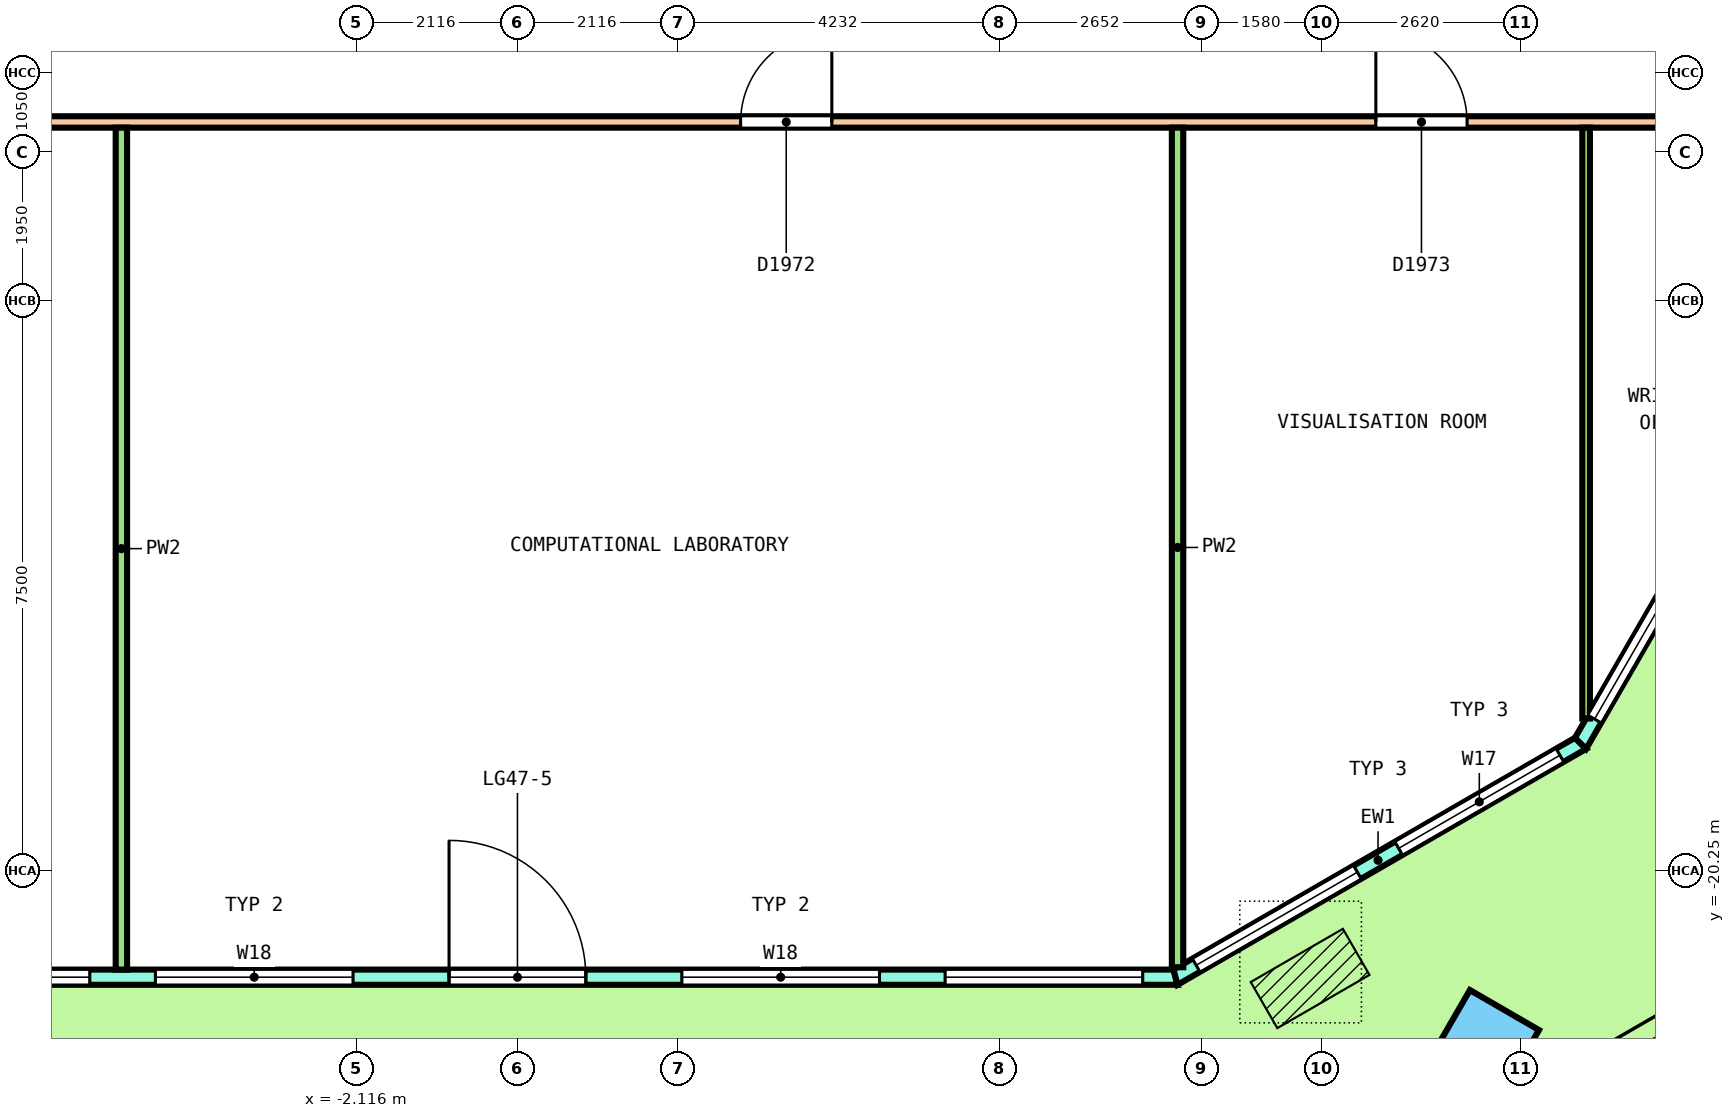
"""IFC4 building model, lengths in metres.
Left out: names, types, materials, properties, quantities, classifications, styles, units other than length and angle.
Written with IfcOpenShell. Run it as: python <this file> out.ifc"""

import sys

from ifc_helpers import new_model, si_unit, direction, frame, frame_2d, origin, origin_2d, place, context, subcontext, project, spatial, polyline, rectangle, outline, extrude, element, fill, save


model = new_model("IFC4")
c1 = context("Model", 3, precision=1e-05, world=origin(), true_north=direction((0.0, 1.0)))
c2 = subcontext(c1, "Body", "Model", "MODEL_VIEW")
j1 = project(units=[si_unit("LENGTHUNIT", "METRE"), si_unit("PLANEANGLEUNIT", "RADIAN")], contexts=[c1])
p1 = place(None, origin())
s1 = spatial("IfcSite", under=j1, at=p1, CompositionType="ELEMENT")
p2 = place(p1, origin())
s2 = spatial("IfcBuilding", under=s1, at=p2, CompositionType="ELEMENT")
p3 = place(p2, frame((0.0, 0.0, 219.4)))
s3 = spatial("IfcBuildingStorey", under=s2, at=p3, CompositionType="ELEMENT", Elevation=219.4)
p4 = place(p3, frame((12.722, -22.538, 0.0), z_axis=(-0.018113955825, -0.03141534774, 0.999342263957), x_axis=(0.865990228712, 0.499075001782, 0.031385767027)))
e1 = element("IfcColumn", 1, at=p4, inside=s3, PredefinedType="COLUMN", context=c2, shape_type="SweptSolid", body=[
    extrude(rectangle(XDim=1.05, YDim=1.05, at=origin_2d()), origin(), (0.0, 0.0, 1.0), 3.653),
])
p5 = place(p3, frame((-8.658, -21.651, 0.0), z_axis=(0.0, 0.0, 1.0), x_axis=(1.0, 0.0, 0.0)))
e2 = element("IfcWall", 2, at=p5, inside=s3, PredefinedType="SOLIDWALL", context=c2, shape_type="SweptSolid", body=[
    extrude(outline(polyline([(-0.027, -0.1), (0.995, -0.1), (2.017, -0.1), (3.038, -0.1), (4.06, -0.1), (5.082, -0.1), (6.104, -0.1), (7.125, -0.1), (8.147, -0.1), (9.168, -0.1), (10.19, -0.1), (11.212, -0.1), (12.234, -0.1), (13.255, -0.1), (14.277, -0.1), (15.299, -0.1), (16.321, -0.1), (17.342, -0.1), (17.289, 0.1), (16.273, 0.1), (15.258, 0.1), (14.242, 0.1), (13.227, 0.1), (12.212, 0.1), (11.196, 0.1), (10.181, 0.1), (9.166, 0.1), (8.15, 0.1), (7.135, 0.1), (6.119, 0.1), (5.104, 0.1), (4.088, 0.1), (3.073, 0.1), (2.058, 0.1), (1.042, 0.1), (0.027, 0.1), (-0.027, -0.1)])), origin(), (0.0, 0.0, 1.0), 3.7),
])
p6 = place(p5, frame((0.432, 0.0, 0.1)))
e3 = element("IfcOpeningElement", 3, at=p6, cuts=e2, PredefinedType="OPENING", context=c2, shape_type="SweptSolid", body=[
    extrude(rectangle(XDim=2.6, YDim=2.65, at=frame_2d((1.3, 1.325))), frame((0.0, 0.11, 0.0), z_axis=(0.0, -1.0, 0.0), x_axis=(1.0, 0.0, 0.0)), (0.0, 0.0, 1.0), 0.22),
])
p7 = place(p5, frame((3.895, 0.0, 0.1)))
e4 = element("IfcOpeningElement", 4, at=p7, cuts=e2, PredefinedType="OPENING", context=c2, shape_type="SweptSolid", body=[
    extrude(rectangle(XDim=2.6, YDim=2.65, at=frame_2d((1.3, 1.325))), frame((0.0, 0.11, 0.0), z_axis=(0.0, -1.0, 0.0), x_axis=(1.0, 0.0, 0.0)), (0.0, 0.0, 1.0), 0.22),
])
p8 = place(p5, frame((7.758, 0.0, 0.0)))
e5 = element("IfcOpeningElement", 5, at=p8, cuts=e2, PredefinedType="OPENING", context=c2, shape_type="SweptSolid", body=[
    extrude(rectangle(XDim=1.8, YDim=2.4, at=frame_2d((0.9, 1.2))), frame((0.0, 0.11, 0.0), z_axis=(0.0, -1.0, 0.0), x_axis=(1.0, 0.0, 0.0)), (0.0, 0.0, 1.0), 0.22),
])
p9 = place(p5, frame((7.758, 0.0, 2.55)))
e6 = element("IfcOpeningElement", 6, at=p9, cuts=e2, PredefinedType="OPENING", context=c2, shape_type="SweptSolid", body=[
    extrude(rectangle(XDim=1.8, YDim=0.2, at=frame_2d((0.9, 0.1))), frame((0.0, 0.11, 0.0), z_axis=(0.0, -1.0, 0.0), x_axis=(1.0, 0.0, 0.0)), (0.0, 0.0, 1.0), 0.22),
])
p10 = place(p5, frame((10.821, 0.0, 0.1)))
e7 = element("IfcOpeningElement", 7, at=p10, cuts=e2, PredefinedType="OPENING", context=c2, shape_type="SweptSolid", body=[
    extrude(rectangle(XDim=2.6, YDim=2.65, at=frame_2d((1.3, 1.325))), frame((0.0, 0.11, 0.0), z_axis=(0.0, -1.0, 0.0), x_axis=(1.0, 0.0, 0.0)), (0.0, 0.0, 1.0), 0.22),
])
p11 = place(p5, frame((14.284, 0.0, 0.1)))
e8 = element("IfcOpeningElement", 8, at=p11, cuts=e2, PredefinedType="OPENING", context=c2, shape_type="SweptSolid", body=[
    extrude(rectangle(XDim=2.6, YDim=2.65, at=frame_2d((1.3, 1.325))), frame((0.0, 0.11, 0.0), z_axis=(0.0, -1.0, 0.0), x_axis=(1.0, 0.0, 0.0)), (0.0, 0.0, 1.0), 0.22),
])
p12 = place(p3, frame((8.658, -21.651, 0.0), z_axis=(0.0, 0.0, 1.0), x_axis=(0.866029647142, 0.499992650217, 0.0)))
e9 = element("IfcWall", 9, at=p12, inside=s3, PredefinedType="SOLIDWALL", context=c2, shape_type="SweptSolid", body=[
    extrude(outline(polyline([(-0.027, -0.1), (1.008, -0.1), (2.042, -0.1), (3.076, -0.1), (4.111, -0.1), (5.145, -0.1), (6.18, -0.1), (6.126, 0.1), (5.109, 0.1), (4.093, 0.1), (3.076, 0.1), (2.06, 0.1), (1.043, 0.1), (0.027, 0.1), (-0.027, -0.1)])), origin(), (0.0, 0.0, 1.0), 3.7),
])
p13 = place(p12, frame((0.313, 0.0, 0.1)))
e10 = element("IfcOpeningElement", 10, at=p13, cuts=e9, PredefinedType="OPENING", context=c2, shape_type="SweptSolid", body=[
    extrude(rectangle(XDim=2.45, YDim=2.65, at=frame_2d((1.225, 1.325))), frame((0.0, 0.11, 0.0), z_axis=(0.0, -1.0, 0.0), x_axis=(1.0, 0.0, 0.0)), (0.0, 0.0, 1.0), 0.22),
])
p14 = place(p12, frame((3.39, 0.0, 0.1)))
e11 = element("IfcOpeningElement", 11, at=p14, cuts=e9, PredefinedType="OPENING", context=c2, shape_type="SweptSolid", body=[
    extrude(rectangle(XDim=2.45, YDim=2.65, at=frame_2d((1.225, 1.325))), frame((0.0, 0.11, 0.0), z_axis=(0.0, -1.0, 0.0), x_axis=(1.0, 0.0, 0.0)), (0.0, 0.0, 1.0), 0.22),
])
p15 = place(p3, frame((13.986, -18.575, 0.0), z_axis=(0.0, 0.0, 1.0), x_axis=(0.500005605865, 0.866022167212, 0.0)))
e12 = element("IfcWall", 12, at=p15, inside=s3, PredefinedType="SOLIDWALL", context=c2, shape_type="SweptSolid", body=[
    extrude(outline(polyline([(-0.027, -0.1), (0.987, -0.1), (2.0, -0.1), (3.013, -0.1), (4.026, -0.1), (5.04, -0.1), (6.053, -0.1), (7.066, -0.1), (8.08, -0.1), (9.093, -0.1), (10.106, -0.1), (11.12, -0.1), (12.133, -0.1), (13.146, -0.1), (14.16, -0.1), (15.173, -0.1), (16.187, -0.1), (17.2, -0.1), (18.213, -0.1), (18.159, 0.1), (17.152, 0.1), (16.145, 0.1), (15.137, 0.1), (14.13, 0.1), (13.123, 0.1), (12.115, 0.1), (11.108, 0.1), (10.101, 0.1), (9.093, 0.1), (8.086, 0.1), (7.078, 0.1), (6.071, 0.1), (5.064, 0.1), (4.056, 0.1), (3.049, 0.1), (2.042, 0.1), (1.034, 0.1), (0.027, 0.1), (-0.027, -0.1)])), origin(), (0.0, 0.0, 1.0), 3.7),
])
p16 = place(p15, frame((0.369, 0.0, 0.1)))
e13 = element("IfcOpeningElement", 13, at=p16, cuts=e12, PredefinedType="OPENING", context=c2, shape_type="SweptSolid", body=[
    extrude(rectangle(XDim=2.9, YDim=2.65, at=frame_2d((1.45, 1.325))), frame((0.0, 0.11, 0.0), z_axis=(0.0, -1.0, 0.0), x_axis=(1.0, 0.0, 0.0)), (0.0, 0.0, 1.0), 0.22),
])
p17 = place(p15, frame((4.006, 0.0, 0.1)))
e14 = element("IfcOpeningElement", 14, at=p17, cuts=e12, PredefinedType="OPENING", context=c2, shape_type="SweptSolid", body=[
    extrude(rectangle(XDim=2.9, YDim=2.65, at=frame_2d((1.45, 1.325))), frame((0.0, 0.11, 0.0), z_axis=(0.0, -1.0, 0.0), x_axis=(1.0, 0.0, 0.0)), (0.0, 0.0, 1.0), 0.22),
])
p18 = place(p15, frame((8.193, 0.0, 0.0)))
e15 = element("IfcOpeningElement", 15, at=p18, cuts=e12, PredefinedType="OPENING", context=c2, shape_type="SweptSolid", body=[
    extrude(rectangle(XDim=1.8, YDim=2.4, at=frame_2d((0.9, 1.2))), frame((0.0, 0.11, 0.0), z_axis=(0.0, -1.0, 0.0), x_axis=(1.0, 0.0, 0.0)), (0.0, 0.0, 1.0), 0.22),
])
p19 = place(p15, frame((8.193, 0.0, 2.55)))
e16 = element("IfcOpeningElement", 16, at=p19, cuts=e12, PredefinedType="OPENING", context=c2, shape_type="SweptSolid", body=[
    extrude(rectangle(XDim=1.8, YDim=0.2, at=frame_2d((0.9, 0.1))), frame((0.0, 0.11, 0.0), z_axis=(0.0, -1.0, 0.0), x_axis=(1.0, 0.0, 0.0)), (0.0, 0.0, 1.0), 0.22),
])
p20 = place(p15, frame((11.281, 0.0, 0.1)))
e17 = element("IfcOpeningElement", 17, at=p20, cuts=e12, PredefinedType="OPENING", context=c2, shape_type="SweptSolid", body=[
    extrude(rectangle(XDim=2.9, YDim=2.65, at=frame_2d((1.45, 1.325))), frame((0.0, 0.11, 0.0), z_axis=(0.0, -1.0, 0.0), x_axis=(1.0, 0.0, 0.0)), (0.0, 0.0, 1.0), 0.22),
])
p21 = place(p15, frame((14.918, 0.0, 0.1)))
e18 = element("IfcOpeningElement", 18, at=p21, cuts=e12, PredefinedType="OPENING", context=c2, shape_type="SweptSolid", body=[
    extrude(rectangle(XDim=2.9, YDim=2.65, at=frame_2d((1.45, 1.325))), frame((0.0, 0.11, 0.0), z_axis=(0.0, -1.0, 0.0), x_axis=(1.0, 0.0, 0.0)), (0.0, 0.0, 1.0), 0.22),
])
p22 = place(p3, frame((-15.45, -10.4, 0.0), z_axis=(0.0, 0.0, 1.0), x_axis=(1.0, 0.0, 0.0)))
e19 = element("IfcWall", 19, at=p22, inside=s3, PredefinedType="PARTITIONING", context=c2, shape_type="SweptSolid", body=[
    extrude(rectangle(XDim=31.025, YDim=0.15, at=frame_2d((15.512, 0.0))), origin(), (0.0, 0.0, 1.0), 2.8),
])
p23 = place(p22, frame((4.173, 0.0, 0.0)))
e20 = element("IfcOpeningElement", 20, at=p23, cuts=e19, PredefinedType="OPENING", context=c2, shape_type="SweptSolid", body=[
    extrude(rectangle(XDim=1.2, YDim=2.1, at=frame_2d((0.6, 1.05))), frame((0.0, 0.085, 0.0), z_axis=(0.0, -1.0, 0.0), x_axis=(1.0, 0.0, 0.0)), (0.0, 0.0, 1.0), 0.17),
])
p24 = place(p22, frame((18.386, 0.0, 0.0)))
e21 = element("IfcOpeningElement", 21, at=p24, cuts=e19, PredefinedType="OPENING", context=c2, shape_type="SweptSolid", body=[
    extrude(rectangle(XDim=1.2, YDim=2.1, at=frame_2d((0.6, 1.05))), frame((0.0, 0.085, 0.0), z_axis=(0.0, -1.0, 0.0), x_axis=(1.0, 0.0, 0.0)), (0.0, 0.0, 1.0), 0.17),
])
p25 = place(p22, frame((26.743, 0.0, 0.0)))
e22 = element("IfcOpeningElement", 22, at=p25, cuts=e19, PredefinedType="OPENING", context=c2, shape_type="SweptSolid", body=[
    extrude(rectangle(XDim=1.2, YDim=2.1, at=frame_2d((0.6, 1.05))), frame((0.0, 0.085, 0.0), z_axis=(0.0, -1.0, 0.0), x_axis=(1.0, 0.0, 0.0)), (0.0, 0.0, 1.0), 0.17),
])
p26 = place(p3, frame((-5.211, -21.552, 0.0), z_axis=(0.0, 0.0, 1.0), x_axis=(0.0, 1.0, 0.0)))
e23 = element("IfcWall", 23, at=p26, inside=s3, PredefinedType="PARTITIONING", context=c2, shape_type="SweptSolid", body=[
    extrude(rectangle(XDim=11.076, YDim=0.15, at=frame_2d((5.538, 0.0))), origin(), (0.0, 0.0, 1.0), 2.8),
])
p27 = place(p3, frame((8.685, -21.521, 0.0), z_axis=(0.0, 0.0, 1.0), x_axis=(0.0, 1.0, 0.0)))
e24 = element("IfcWall", 24, at=p27, inside=s3, PredefinedType="PARTITIONING", context=c2, shape_type="SweptSolid", body=[
    extrude(rectangle(XDim=11.045, YDim=0.15, at=frame_2d((5.523, 0.0))), origin(), (0.0, 0.0, 1.0), 2.8),
])
p28 = place(p3, frame((14.06, -18.248, 0.0), z_axis=(0.0, 0.0, 1.0), x_axis=(0.0, 1.0, 0.0)))
e25 = element("IfcWall", 25, at=p28, inside=s3, PredefinedType="PARTITIONING", context=c2, shape_type="SweptSolid", body=[
    extrude(rectangle(XDim=7.773, YDim=0.1, at=frame_2d((3.887, 0.0))), origin(), (0.0, 0.0, 1.0), 2.8),
])
p29 = place(p6, origin())
e26 = element("IfcWindow", 26, at=p29, inside=s3, PartitioningType="SINGLE_PANEL", PredefinedType="WINDOW", context=c2, shape_type="SweptSolid", body=[
    extrude(rectangle(XDim=2.6, YDim=2.65, at=frame_2d((1.3, 1.325))), frame((0.0, 0.03, 0.0), z_axis=(0.0, -1.0, 0.0), x_axis=(1.0, 0.0, 0.0)), (0.0, 0.0, 1.0), 0.06),
])
fill(e3, e26)
p30 = place(p7, origin())
e27 = element("IfcWindow", 27, at=p30, inside=s3, PartitioningType="SINGLE_PANEL", PredefinedType="WINDOW", context=c2, shape_type="SweptSolid", body=[
    extrude(rectangle(XDim=2.6, YDim=2.65, at=frame_2d((1.3, 1.325))), frame((0.0, 0.03, 0.0), z_axis=(0.0, -1.0, 0.0), x_axis=(1.0, 0.0, 0.0)), (0.0, 0.0, 1.0), 0.06),
])
fill(e4, e27)
p31 = place(p8, origin())
e28 = element("IfcDoor", 28, at=p31, inside=s3, OperationType="DOUBLE_DOOR_SINGLE_SWING", PredefinedType="DOOR", context=c2, shape_type="SweptSolid", body=[
    extrude(rectangle(XDim=1.8, YDim=2.4, at=frame_2d((0.9, 1.2))), frame((0.0, 0.025, 0.0), z_axis=(0.0, -1.0, 0.0), x_axis=(1.0, 0.0, 0.0)), (0.0, 0.0, 1.0), 0.05),
])
fill(e5, e28)
p32 = place(p9, origin())
e29 = element("IfcWindow", 29, at=p32, inside=s3, PartitioningType="SINGLE_PANEL", PredefinedType="WINDOW", context=c2, shape_type="SweptSolid", body=[
    extrude(rectangle(XDim=1.8, YDim=0.2, at=frame_2d((0.9, 0.1))), frame((0.0, 0.03, 0.0), z_axis=(0.0, -1.0, 0.0), x_axis=(1.0, 0.0, 0.0)), (0.0, 0.0, 1.0), 0.06),
])
fill(e6, e29)
p33 = place(p10, origin())
e30 = element("IfcWindow", 30, at=p33, inside=s3, PartitioningType="SINGLE_PANEL", PredefinedType="WINDOW", context=c2, shape_type="SweptSolid", body=[
    extrude(rectangle(XDim=2.6, YDim=2.65, at=frame_2d((1.3, 1.325))), frame((0.0, 0.03, 0.0), z_axis=(0.0, -1.0, 0.0), x_axis=(1.0, 0.0, 0.0)), (0.0, 0.0, 1.0), 0.06),
])
fill(e7, e30)
p34 = place(p11, origin())
e31 = element("IfcWindow", 31, at=p34, inside=s3, PartitioningType="SINGLE_PANEL", PredefinedType="WINDOW", context=c2, shape_type="SweptSolid", body=[
    extrude(rectangle(XDim=2.6, YDim=2.65, at=frame_2d((1.3, 1.325))), frame((0.0, 0.03, 0.0), z_axis=(0.0, -1.0, 0.0), x_axis=(1.0, 0.0, 0.0)), (0.0, 0.0, 1.0), 0.06),
])
fill(e8, e31)
p35 = place(p13, origin())
e32 = element("IfcWindow", 32, at=p35, inside=s3, PartitioningType="SINGLE_PANEL", PredefinedType="WINDOW", context=c2, shape_type="SweptSolid", body=[
    extrude(rectangle(XDim=2.45, YDim=2.65, at=frame_2d((1.225, 1.325))), frame((0.0, 0.03, 0.0), z_axis=(0.0, -1.0, 0.0), x_axis=(1.0, 0.0, 0.0)), (0.0, 0.0, 1.0), 0.06),
])
fill(e10, e32)
p36 = place(p14, origin())
e33 = element("IfcWindow", 33, at=p36, inside=s3, PartitioningType="SINGLE_PANEL", PredefinedType="WINDOW", context=c2, shape_type="SweptSolid", body=[
    extrude(rectangle(XDim=2.45, YDim=2.65, at=frame_2d((1.225, 1.325))), frame((0.0, 0.03, 0.0), z_axis=(0.0, -1.0, 0.0), x_axis=(1.0, 0.0, 0.0)), (0.0, 0.0, 1.0), 0.06),
])
fill(e11, e33)
p37 = place(p16, origin())
e34 = element("IfcWindow", 34, at=p37, inside=s3, PartitioningType="SINGLE_PANEL", PredefinedType="WINDOW", context=c2, shape_type="SweptSolid", body=[
    extrude(rectangle(XDim=2.9, YDim=2.65, at=frame_2d((1.45, 1.325))), frame((0.0, 0.03, 0.0), z_axis=(0.0, -1.0, 0.0), x_axis=(1.0, 0.0, 0.0)), (0.0, 0.0, 1.0), 0.06),
])
fill(e13, e34)
p38 = place(p24, origin())
e35 = element("IfcDoor", 35, at=p38, inside=s3, OperationType="DOUBLE_DOOR_SINGLE_SWING", PredefinedType="DOOR", context=c2, shape_type="SweptSolid", body=[
    extrude(rectangle(XDim=1.2, YDim=2.1, at=frame_2d((0.6, 1.05))), frame((0.0, 0.025, 0.0), z_axis=(0.0, -1.0, 0.0), x_axis=(1.0, 0.0, 0.0)), (0.0, 0.0, 1.0), 0.05),
])
fill(e21, e35)
p39 = place(p25, origin())
e36 = element("IfcDoor", 36, at=p39, inside=s3, OperationType="DOUBLE_DOOR_SINGLE_SWING", PredefinedType="DOOR", context=c2, shape_type="SweptSolid", body=[
    extrude(rectangle(XDim=1.2, YDim=2.1, at=frame_2d((0.6, 1.05))), frame((0.0, 0.025, 0.0), z_axis=(0.0, -1.0, 0.0), x_axis=(1.0, 0.0, 0.0)), (0.0, 0.0, 1.0), 0.05),
])
fill(e22, e36)
save(model, sys.argv[1])
